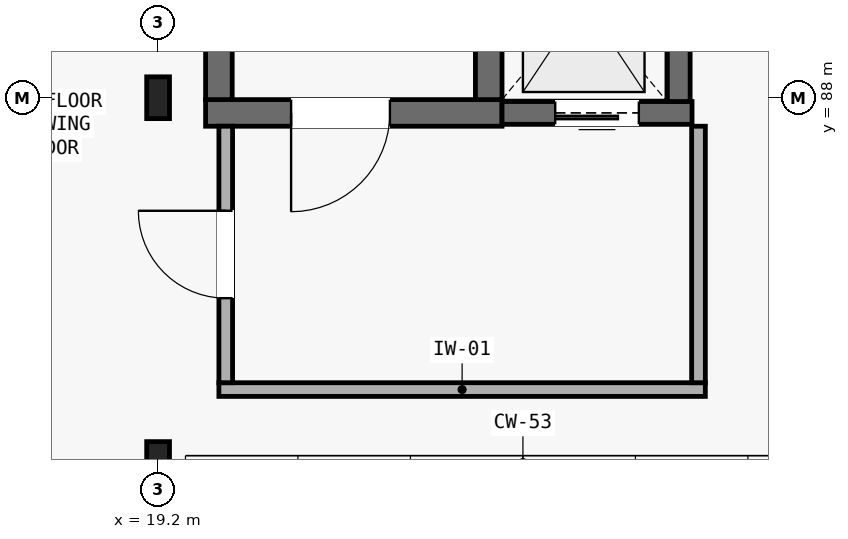
"""IFC4 building model, lengths in metres.
Left out: names, types, materials, properties, quantities, classifications, styles, units other than length and angle.
Written with IfcOpenShell. Run it as: python <this file> out.ifc"""

import sys

from ifc_helpers import new_model, si_unit, direction, frame, frame_2d, origin, origin_2d, place, context, subcontext, project, spatial, rectangle, i_section, extrude, element, fill, save


model = new_model("IFC4")
c1 = context("Model", 3, precision=1e-05, world=origin(), true_north=direction((0.0, 1.0)))
c2 = subcontext(c1, "Body", "Model", "MODEL_VIEW")
j1 = project(units=[si_unit("LENGTHUNIT", "METRE"), si_unit("PLANEANGLEUNIT", "RADIAN")], contexts=[c1])
p1 = place(None, origin())
s1 = spatial("IfcSite", under=j1, at=p1, CompositionType="ELEMENT")
p2 = place(p1, origin())
s2 = spatial("IfcBuilding", under=s1, at=p2, CompositionType="ELEMENT")
p3 = place(p2, frame((0.0, 0.0, 9.45)))
s3 = spatial("IfcBuildingStorey", under=s2, at=p3, CompositionType="ELEMENT", Elevation=9.45)
for number, where, z_axis, x_axis in (
    (1, (19.2, 83.2, 0.0), (0.0, 0.0, 1.0), (1.0, 0.0, 0.0)),
    (2, (19.2, 88.0, 0.0), (0.0, 0.0, 1.0), (1.0, 0.0, 0.0)),
):
    element("IfcColumn", number, at=place(p3, frame(where, z_axis=z_axis, x_axis=x_axis)), inside=s3, PredefinedType="COLUMN", context=c2, shape_type="SweptSolid", body=[
        extrude(i_section(OverallWidth=0.3, OverallDepth=0.55, WebThickness=0.015, FlangeThickness=0.029, FilletRadius=0.027, at=origin_2d()), origin(), (0.0, 0.0, 1.0), 4.2),
    ])
p4 = place(p3, frame((19.825, 87.8, 0.0), z_axis=(0.0, 0.0, 1.0), x_axis=(1.0, 0.0, 0.0)))
e3 = element("IfcWall", 3, at=p4, inside=s3, PredefinedType="SHEAR", context=c2, shape_type="SweptSolid", body=[
    extrude(rectangle(XDim=3.9, YDim=0.35, at=frame_2d((1.95, 0.0))), origin(), (0.0, 0.0, 1.0), 3.97),
])
p5 = place(p4, frame((1.125, 0.0, 0.0)))
e4 = element("IfcOpeningElement", 4, at=p5, cuts=e3, PredefinedType="OPENING", context=c2, shape_type="SweptSolid", body=[
    extrude(rectangle(XDim=1.3, YDim=2.15, at=frame_2d((0.65, 1.075))), frame((0.0, 0.185, 0.0), z_axis=(0.0, -1.0, 0.0), x_axis=(1.0, 0.0, 0.0)), (0.0, 0.0, 1.0), 0.37),
])
for number, where, z_axis, x_axis in (
    (5, (20.0, 87.975, 0.0), (0.0, 0.0, 1.0), (0.0, 1.0, 0.0)),
    (6, (23.55, 87.975, 0.0), (0.0, 0.0, 1.0), (0.0, 1.0, 0.0)),
):
    element("IfcWall", number, at=place(p3, frame(where, z_axis=z_axis, x_axis=x_axis)), inside=s3, PredefinedType="SHEAR", context=c2, shape_type="SweptSolid", body=[
        extrude(rectangle(XDim=7.6, YDim=0.35, at=frame_2d((3.8, 0.0))), origin(), (0.0, 0.0, 1.0), 3.97),
    ])
p6 = place(p3, frame((23.725, 87.8, 0.0), z_axis=(0.0, 0.0, 1.0), x_axis=(1.0, 0.0, 0.0)))
e7 = element("IfcWall", 7, at=p6, inside=s3, PredefinedType="SHEAR", context=c2, shape_type="SweptSolid", body=[
    extrude(rectangle(XDim=2.5, YDim=0.3, at=frame_2d((1.25, 0.0))), origin(), (0.0, 0.0, 1.0), 3.97),
])
p7 = place(p6, frame((0.7, 0.0, 0.0)))
e8 = element("IfcOpeningElement", 8, at=p7, cuts=e7, PredefinedType="OPENING", context=c2, shape_type="SweptSolid", body=[
    extrude(rectangle(XDim=1.1, YDim=2.1, at=frame_2d((0.55, 1.05))), frame((0.0, 0.16, 0.0), z_axis=(0.0, -1.0, 0.0), x_axis=(1.0, 0.0, 0.0)), (0.0, 0.0, 1.0), 0.32),
])
p8 = place(p3, frame((26.05, 87.95, 0.0), z_axis=(0.0, 0.0, 1.0), x_axis=(0.0, 1.0, 0.0)))
e9 = element("IfcWall", 9, at=p8, inside=s3, PredefinedType="SHEAR", context=c2, shape_type="SweptSolid", body=[
    extrude(rectangle(XDim=2.65, YDim=0.3, at=frame_2d((1.325, 0.0))), origin(), (0.0, 0.0, 1.0), 3.97),
])
p9 = place(p3, frame((20.0, 84.16, 0.0), z_axis=(0.0, 0.0, 1.0), x_axis=(1.0, 0.0, 0.0)))
e10 = element("IfcWall", 10, at=p9, inside=s3, PredefinedType="PARTITIONING", context=c2, shape_type="SweptSolid", body=[
    extrude(rectangle(XDim=6.4, YDim=0.18, at=frame_2d((3.2, 0.0))), origin(), (0.0, 0.0, 1.0), 3.97),
])
p10 = place(p3, frame((20.09, 84.25, 0.0), z_axis=(0.0, 0.0, 1.0), x_axis=(0.0, 1.0, 0.0)))
e11 = element("IfcWall", 11, at=p10, inside=s3, PredefinedType="PARTITIONING", context=c2, shape_type="SweptSolid", body=[
    extrude(rectangle(XDim=3.375, YDim=0.18, at=frame_2d((1.688, 0.0))), origin(), (0.0, 0.0, 1.0), 3.97),
])
p11 = place(p10, frame((1.113, 0.0, 0.0)))
e12 = element("IfcOpeningElement", 12, at=p11, cuts=e11, PredefinedType="OPENING", context=c2, shape_type="SweptSolid", body=[
    extrude(rectangle(XDim=1.15, YDim=2.15, at=frame_2d((0.575, 1.075))), frame((0.0, 0.1, 0.0), z_axis=(0.0, -1.0, 0.0), x_axis=(1.0, 0.0, 0.0)), (0.0, 0.0, 1.0), 0.2),
])
p12 = place(p3, frame((26.31, 84.25, 0.0), z_axis=(0.0, 0.0, 1.0), x_axis=(0.0, 1.0, 0.0)))
e13 = element("IfcWall", 13, at=p12, inside=s3, PredefinedType="PARTITIONING", context=c2, shape_type="SweptSolid", body=[
    extrude(rectangle(XDim=3.375, YDim=0.18, at=frame_2d((1.688, 0.0))), origin(), (0.0, 0.0, 1.0), 3.97),
])
p13 = place(p5, frame((1.3, 0.0, 0.0), z_axis=(0.0, 0.0, 1.0), x_axis=(-1.0, 0.0, 0.0)))
e14 = element("IfcDoor", 14, at=p13, inside=s3, OperationType="SINGLE_SWING_LEFT", PredefinedType="DOOR", context=c2, shape_type="SweptSolid", body=[
    extrude(rectangle(XDim=1.3, YDim=2.15, at=frame_2d((0.65, 1.075))), frame((0.0, 0.025, 0.0), z_axis=(0.0, -1.0, 0.0), x_axis=(1.0, 0.0, 0.0)), (0.0, 0.0, 1.0), 0.05),
])
fill(e4, e14)
p14 = place(p7, frame((1.1, 0.0, 0.0), z_axis=(0.0, 0.0, 1.0), x_axis=(-1.0, 0.0, 0.0)))
e15 = element("IfcDoor", 15, at=p14, inside=s3, OperationType="SLIDING_TO_LEFT", PredefinedType="DOOR", context=c2, shape_type="SweptSolid", body=[
    extrude(rectangle(XDim=1.1, YDim=2.1, at=frame_2d((0.55, 1.05))), frame((0.0, 0.025, 0.0), z_axis=(0.0, -1.0, 0.0), x_axis=(1.0, 0.0, 0.0)), (0.0, 0.0, 1.0), 0.05),
])
fill(e8, e15)
p15 = place(p11, origin())
e16 = element("IfcDoor", 16, at=p15, inside=s3, OperationType="SINGLE_SWING_RIGHT", PredefinedType="DOOR", context=c2, shape_type="SweptSolid", body=[
    extrude(rectangle(XDim=1.15, YDim=2.15, at=frame_2d((0.575, 1.075))), frame((0.0, 0.025, 0.0), z_axis=(0.0, -1.0, 0.0), x_axis=(1.0, 0.0, 0.0)), (0.0, 0.0, 1.0), 0.05),
])
fill(e12, e16)
save(model, sys.argv[1])
